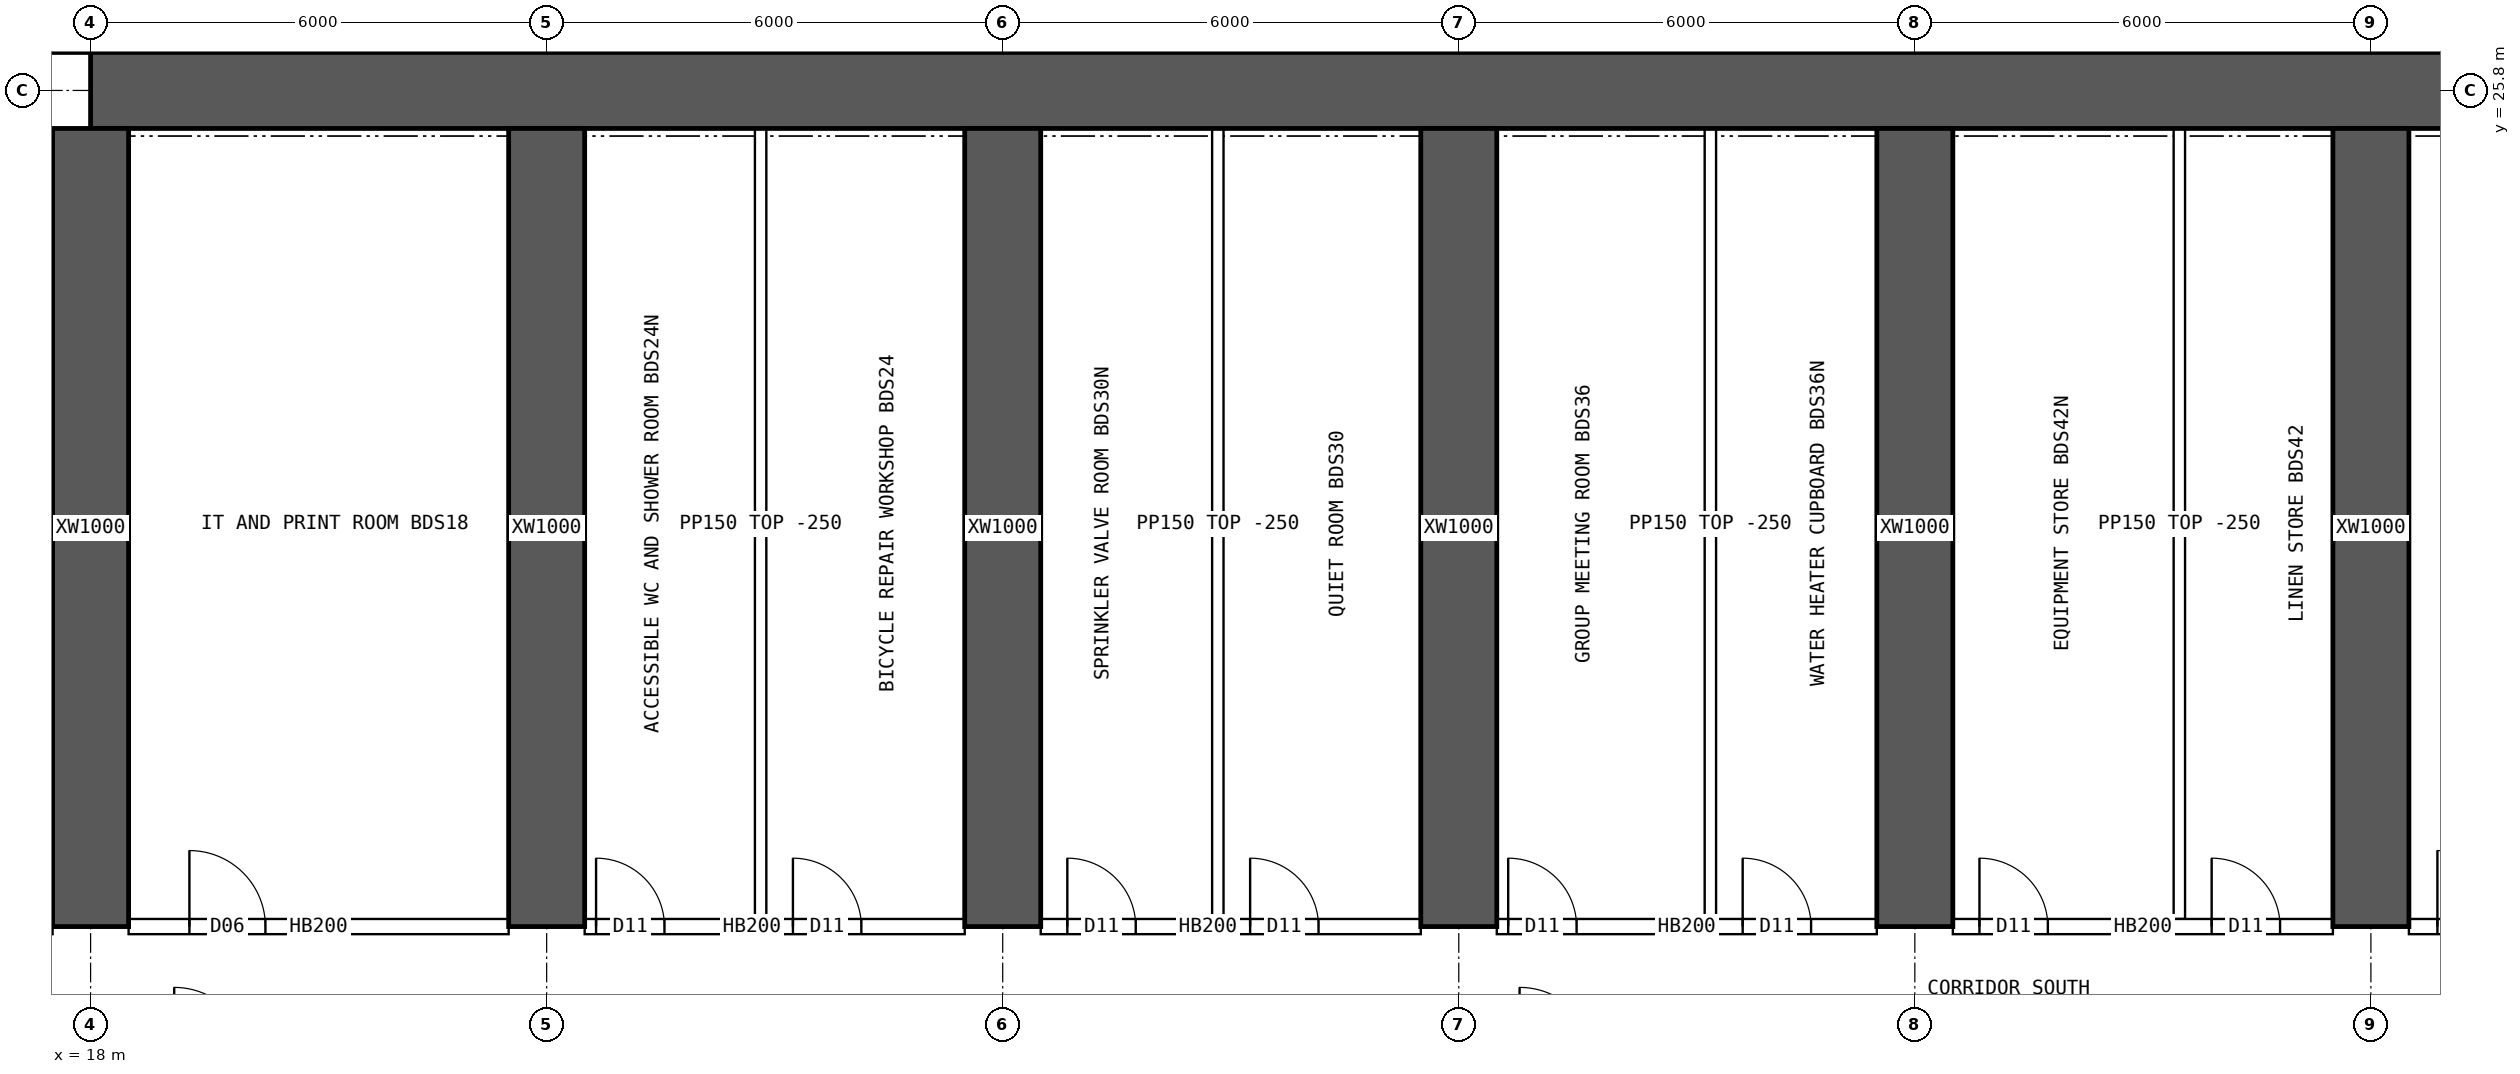
"""IFC4 building model, lengths in metres.
Left out: names, types, materials, properties, quantities, classifications, styles, units other than length and angle.
Written with IfcOpenShell. Run it as: python <this file> out.ifc"""

import sys

from ifc_helpers import new_model, si_unit, direction, frame, frame_2d, origin, place, context, subcontext, project, spatial, rectangle, extrude, element, fill, save


model = new_model("IFC4")
c1 = context("Model", 3, precision=1e-05, world=origin(), true_north=direction((0.0, 1.0)))
c2 = subcontext(c1, "Body", "Model", "MODEL_VIEW")
j1 = project(units=[si_unit("LENGTHUNIT", "METRE"), si_unit("PLANEANGLEUNIT", "RADIAN")], contexts=[c1])
p1 = place(None, origin())
s1 = spatial("IfcSite", under=j1, at=p1, CompositionType="ELEMENT")
p2 = place(p1, origin())
s2 = spatial("IfcBuilding", under=s1, at=p2, CompositionType="ELEMENT")
p3 = place(p2, frame((0.0, 0.0, 46.45)))
s3 = spatial("IfcBuildingStorey", under=s2, at=p3, CompositionType="ELEMENT", Elevation=46.45)
p4 = place(p3, frame((18.0, 25.8, 0.0), z_axis=(0.0, 0.0, 1.0), x_axis=(1.0, 0.0, 0.0)))
e1 = element("IfcWall", 1, at=p4, inside=s3, PredefinedType="SHEAR", context=c2, shape_type="SweptSolid", body=[
    extrude(rectangle(XDim=48.0, YDim=1.0, at=frame_2d((24.0, 0.0))), origin(), (0.0, 0.0, 1.0), 3.75),
])
for number, where, z_axis, x_axis in (
    (2, (18.0, 14.8, 0.0), (0.0, 0.0, 1.0), (0.0, 1.0, 0.0)),
    (3, (24.0, 14.8, 0.0), (0.0, 0.0, 1.0), (0.0, 1.0, 0.0)),
    (4, (30.0, 14.8, 0.0), (0.0, 0.0, 1.0), (0.0, 1.0, 0.0)),
    (5, (36.0, 14.8, 0.0), (0.0, 0.0, 1.0), (0.0, 1.0, 0.0)),
    (6, (42.0, 14.8, 0.0), (0.0, 0.0, 1.0), (0.0, 1.0, 0.0)),
    (7, (48.0, 14.8, 0.0), (0.0, 0.0, 1.0), (0.0, 1.0, 0.0)),
):
    element("IfcWall", number, at=place(p3, frame(where, z_axis=z_axis, x_axis=x_axis)), inside=s3, PredefinedType="SHEAR", context=c2, shape_type="SweptSolid", body=[
        extrude(rectangle(XDim=10.5, YDim=1.0, at=frame_2d((5.25, 0.0))), origin(), (0.0, 0.0, 1.0), 3.75),
    ])
p5 = place(p3, frame((18.5, 14.8, 0.0), z_axis=(0.0, 0.0, 1.0), x_axis=(1.0, 0.0, 0.0)))
e8 = element("IfcWall", 8, at=p5, inside=s3, PredefinedType="SOLIDWALL", context=c2, shape_type="SweptSolid", body=[
    extrude(rectangle(XDim=5.0, YDim=0.2, at=frame_2d((2.5, 0.0))), origin(), (0.0, 0.0, 1.0), 3.5),
])
p6 = place(p5, frame((0.8, 0.0, 0.0)))
e9 = element("IfcOpeningElement", 9, at=p6, cuts=e8, PredefinedType="OPENING", context=c2, shape_type="SweptSolid", body=[
    extrude(rectangle(XDim=1.0, YDim=2.1, at=frame_2d((0.5, 1.05))), frame((0.0, 0.11, 0.0), z_axis=(0.0, -1.0, 0.0), x_axis=(1.0, 0.0, 0.0)), (0.0, 0.0, 1.0), 0.22),
])
p7 = place(p3, frame((24.5, 14.8, 0.0), z_axis=(0.0, 0.0, 1.0), x_axis=(1.0, 0.0, 0.0)))
e10 = element("IfcWall", 10, at=p7, inside=s3, PredefinedType="SOLIDWALL", context=c2, shape_type="SweptSolid", body=[
    extrude(rectangle(XDim=5.0, YDim=0.2, at=frame_2d((2.5, 0.0))), origin(), (0.0, 0.0, 1.0), 3.5),
])
p8 = place(p7, frame((0.15, 0.0, 0.0)))
e11 = element("IfcOpeningElement", 11, at=p8, cuts=e10, PredefinedType="OPENING", context=c2, shape_type="SweptSolid", body=[
    extrude(rectangle(XDim=0.9, YDim=2.1, at=frame_2d((0.45, 1.05))), frame((0.0, 0.11, 0.0), z_axis=(0.0, -1.0, 0.0), x_axis=(1.0, 0.0, 0.0)), (0.0, 0.0, 1.0), 0.22),
])
p9 = place(p7, frame((2.74, 0.0, 0.0)))
e12 = element("IfcOpeningElement", 12, at=p9, cuts=e10, PredefinedType="OPENING", context=c2, shape_type="SweptSolid", body=[
    extrude(rectangle(XDim=0.9, YDim=2.1, at=frame_2d((0.45, 1.05))), frame((0.0, 0.11, 0.0), z_axis=(0.0, -1.0, 0.0), x_axis=(1.0, 0.0, 0.0)), (0.0, 0.0, 1.0), 0.22),
])
p10 = place(p3, frame((30.5, 14.8, 0.0), z_axis=(0.0, 0.0, 1.0), x_axis=(1.0, 0.0, 0.0)))
e13 = element("IfcWall", 13, at=p10, inside=s3, PredefinedType="SOLIDWALL", context=c2, shape_type="SweptSolid", body=[
    extrude(rectangle(XDim=5.0, YDim=0.2, at=frame_2d((2.5, 0.0))), origin(), (0.0, 0.0, 1.0), 3.5),
])
p11 = place(p10, frame((0.35, 0.0, 0.0)))
e14 = element("IfcOpeningElement", 14, at=p11, cuts=e13, PredefinedType="OPENING", context=c2, shape_type="SweptSolid", body=[
    extrude(rectangle(XDim=0.9, YDim=2.1, at=frame_2d((0.45, 1.05))), frame((0.0, 0.11, 0.0), z_axis=(0.0, -1.0, 0.0), x_axis=(1.0, 0.0, 0.0)), (0.0, 0.0, 1.0), 0.22),
])
p12 = place(p10, frame((2.755, 0.0, 0.0)))
e15 = element("IfcOpeningElement", 15, at=p12, cuts=e13, PredefinedType="OPENING", context=c2, shape_type="SweptSolid", body=[
    extrude(rectangle(XDim=0.9, YDim=2.1, at=frame_2d((0.45, 1.05))), frame((0.0, 0.11, 0.0), z_axis=(0.0, -1.0, 0.0), x_axis=(1.0, 0.0, 0.0)), (0.0, 0.0, 1.0), 0.22),
])
p13 = place(p3, frame((36.5, 14.8, 0.0), z_axis=(0.0, 0.0, 1.0), x_axis=(1.0, 0.0, 0.0)))
e16 = element("IfcWall", 16, at=p13, inside=s3, PredefinedType="SOLIDWALL", context=c2, shape_type="SweptSolid", body=[
    extrude(rectangle(XDim=5.0, YDim=0.2, at=frame_2d((2.5, 0.0))), origin(), (0.0, 0.0, 1.0), 3.5),
])
p14 = place(p13, frame((0.15, 0.0, 0.0)))
e17 = element("IfcOpeningElement", 17, at=p14, cuts=e16, PredefinedType="OPENING", context=c2, shape_type="SweptSolid", body=[
    extrude(rectangle(XDim=0.9, YDim=2.1, at=frame_2d((0.45, 1.05))), frame((0.0, 0.11, 0.0), z_axis=(0.0, -1.0, 0.0), x_axis=(1.0, 0.0, 0.0)), (0.0, 0.0, 1.0), 0.22),
])
p15 = place(p13, frame((3.235, 0.0, 0.0)))
e18 = element("IfcOpeningElement", 18, at=p15, cuts=e16, PredefinedType="OPENING", context=c2, shape_type="SweptSolid", body=[
    extrude(rectangle(XDim=0.9, YDim=2.1, at=frame_2d((0.45, 1.05))), frame((0.0, 0.11, 0.0), z_axis=(0.0, -1.0, 0.0), x_axis=(1.0, 0.0, 0.0)), (0.0, 0.0, 1.0), 0.22),
])
p16 = place(p3, frame((42.5, 14.8, 0.0), z_axis=(0.0, 0.0, 1.0), x_axis=(1.0, 0.0, 0.0)))
e19 = element("IfcWall", 19, at=p16, inside=s3, PredefinedType="SOLIDWALL", context=c2, shape_type="SweptSolid", body=[
    extrude(rectangle(XDim=5.0, YDim=0.2, at=frame_2d((2.5, 0.0))), origin(), (0.0, 0.0, 1.0), 3.5),
])
p17 = place(p16, frame((0.35, 0.0, 0.0)))
e20 = element("IfcOpeningElement", 20, at=p17, cuts=e19, PredefinedType="OPENING", context=c2, shape_type="SweptSolid", body=[
    extrude(rectangle(XDim=0.9, YDim=2.1, at=frame_2d((0.45, 1.05))), frame((0.0, 0.11, 0.0), z_axis=(0.0, -1.0, 0.0), x_axis=(1.0, 0.0, 0.0)), (0.0, 0.0, 1.0), 0.22),
])
p18 = place(p16, frame((3.405, 0.0, 0.0)))
e21 = element("IfcOpeningElement", 21, at=p18, cuts=e19, PredefinedType="OPENING", context=c2, shape_type="SweptSolid", body=[
    extrude(rectangle(XDim=0.9, YDim=2.1, at=frame_2d((0.45, 1.05))), frame((0.0, 0.11, 0.0), z_axis=(0.0, -1.0, 0.0), x_axis=(1.0, 0.0, 0.0)), (0.0, 0.0, 1.0), 0.22),
])
p19 = place(p3, frame((48.5, 14.8, 0.0), z_axis=(0.0, 0.0, 1.0), x_axis=(1.0, 0.0, 0.0)))
e22 = element("IfcWall", 22, at=p19, inside=s3, PredefinedType="SOLIDWALL", context=c2, shape_type="SweptSolid", body=[
    extrude(rectangle(XDim=5.0, YDim=0.2, at=frame_2d((2.5, 0.0))), origin(), (0.0, 0.0, 1.0), 3.5),
])
p20 = place(p19, frame((0.375, 0.0, 0.0)))
e23 = element("IfcOpeningElement", 23, at=p20, cuts=e22, PredefinedType="OPENING", context=c2, shape_type="SweptSolid", body=[
    extrude(rectangle(XDim=1.0, YDim=2.1, at=frame_2d((0.5, 1.05))), frame((0.0, 0.11, 0.0), z_axis=(0.0, -1.0, 0.0), x_axis=(1.0, 0.0, 0.0)), (0.0, 0.0, 1.0), 0.22),
])
for number, where, z_axis, x_axis in (
    (24, (26.815, 14.9, 0.0), (0.0, 0.0, 1.0), (0.0, 1.0, 0.0)),
    (25, (32.83, 14.9, 0.0), (0.0, 0.0, 1.0), (0.0, 1.0, 0.0)),
    (26, (39.31, 14.9, 0.0), (0.0, 0.0, 1.0), (0.0, 1.0, 0.0)),
    (27, (45.48, 14.9, 0.0), (0.0, 0.0, 1.0), (0.0, 1.0, 0.0)),
):
    element("IfcWall", number, at=place(p3, frame(where, z_axis=z_axis, x_axis=x_axis)), inside=s3, PredefinedType="PARTITIONING", context=c2, shape_type="SweptSolid", body=[
        extrude(rectangle(XDim=10.4, YDim=0.15, at=frame_2d((5.2, 0.0))), origin(), (0.0, 0.0, 1.0), 3.5),
    ])
p21 = place(p6, origin())
e28 = element("IfcDoor", 28, at=p21, inside=s3, OperationType="SINGLE_SWING_LEFT", PredefinedType="DOOR", context=c2, shape_type="SweptSolid", body=[
    extrude(rectangle(XDim=1.0, YDim=2.1, at=frame_2d((0.5, 1.05))), frame((0.0, 0.025, 0.0), z_axis=(0.0, -1.0, 0.0), x_axis=(1.0, 0.0, 0.0)), (0.0, 0.0, 1.0), 0.05),
])
fill(e9, e28)
p22 = place(p8, origin())
e29 = element("IfcDoor", 29, at=p22, inside=s3, OperationType="SINGLE_SWING_LEFT", PredefinedType="DOOR", context=c2, shape_type="SweptSolid", body=[
    extrude(rectangle(XDim=0.9, YDim=2.1, at=frame_2d((0.45, 1.05))), frame((0.0, 0.025, 0.0), z_axis=(0.0, -1.0, 0.0), x_axis=(1.0, 0.0, 0.0)), (0.0, 0.0, 1.0), 0.05),
])
fill(e11, e29)
p23 = place(p9, origin())
e30 = element("IfcDoor", 30, at=p23, inside=s3, OperationType="SINGLE_SWING_LEFT", PredefinedType="DOOR", context=c2, shape_type="SweptSolid", body=[
    extrude(rectangle(XDim=0.9, YDim=2.1, at=frame_2d((0.45, 1.05))), frame((0.0, 0.025, 0.0), z_axis=(0.0, -1.0, 0.0), x_axis=(1.0, 0.0, 0.0)), (0.0, 0.0, 1.0), 0.05),
])
fill(e12, e30)
p24 = place(p11, origin())
e31 = element("IfcDoor", 31, at=p24, inside=s3, OperationType="SINGLE_SWING_LEFT", PredefinedType="DOOR", context=c2, shape_type="SweptSolid", body=[
    extrude(rectangle(XDim=0.9, YDim=2.1, at=frame_2d((0.45, 1.05))), frame((0.0, 0.025, 0.0), z_axis=(0.0, -1.0, 0.0), x_axis=(1.0, 0.0, 0.0)), (0.0, 0.0, 1.0), 0.05),
])
fill(e14, e31)
p25 = place(p12, origin())
e32 = element("IfcDoor", 32, at=p25, inside=s3, OperationType="SINGLE_SWING_LEFT", PredefinedType="DOOR", context=c2, shape_type="SweptSolid", body=[
    extrude(rectangle(XDim=0.9, YDim=2.1, at=frame_2d((0.45, 1.05))), frame((0.0, 0.025, 0.0), z_axis=(0.0, -1.0, 0.0), x_axis=(1.0, 0.0, 0.0)), (0.0, 0.0, 1.0), 0.05),
])
fill(e15, e32)
p26 = place(p14, origin())
e33 = element("IfcDoor", 33, at=p26, inside=s3, OperationType="SINGLE_SWING_LEFT", PredefinedType="DOOR", context=c2, shape_type="SweptSolid", body=[
    extrude(rectangle(XDim=0.9, YDim=2.1, at=frame_2d((0.45, 1.05))), frame((0.0, 0.025, 0.0), z_axis=(0.0, -1.0, 0.0), x_axis=(1.0, 0.0, 0.0)), (0.0, 0.0, 1.0), 0.05),
])
fill(e17, e33)
p27 = place(p15, origin())
e34 = element("IfcDoor", 34, at=p27, inside=s3, OperationType="SINGLE_SWING_LEFT", PredefinedType="DOOR", context=c2, shape_type="SweptSolid", body=[
    extrude(rectangle(XDim=0.9, YDim=2.1, at=frame_2d((0.45, 1.05))), frame((0.0, 0.025, 0.0), z_axis=(0.0, -1.0, 0.0), x_axis=(1.0, 0.0, 0.0)), (0.0, 0.0, 1.0), 0.05),
])
fill(e18, e34)
p28 = place(p17, origin())
e35 = element("IfcDoor", 35, at=p28, inside=s3, OperationType="SINGLE_SWING_LEFT", PredefinedType="DOOR", context=c2, shape_type="SweptSolid", body=[
    extrude(rectangle(XDim=0.9, YDim=2.1, at=frame_2d((0.45, 1.05))), frame((0.0, 0.025, 0.0), z_axis=(0.0, -1.0, 0.0), x_axis=(1.0, 0.0, 0.0)), (0.0, 0.0, 1.0), 0.05),
])
fill(e20, e35)
p29 = place(p18, origin())
e36 = element("IfcDoor", 36, at=p29, inside=s3, OperationType="SINGLE_SWING_LEFT", PredefinedType="DOOR", context=c2, shape_type="SweptSolid", body=[
    extrude(rectangle(XDim=0.9, YDim=2.1, at=frame_2d((0.45, 1.05))), frame((0.0, 0.025, 0.0), z_axis=(0.0, -1.0, 0.0), x_axis=(1.0, 0.0, 0.0)), (0.0, 0.0, 1.0), 0.05),
])
fill(e21, e36)
p30 = place(p20, origin())
e37 = element("IfcDoor", 37, at=p30, inside=s3, OperationType="SINGLE_SWING_LEFT", PredefinedType="DOOR", context=c2, shape_type="SweptSolid", body=[
    extrude(rectangle(XDim=1.0, YDim=2.1, at=frame_2d((0.5, 1.05))), frame((0.0, 0.025, 0.0), z_axis=(0.0, -1.0, 0.0), x_axis=(1.0, 0.0, 0.0)), (0.0, 0.0, 1.0), 0.05),
])
fill(e23, e37)
save(model, sys.argv[1])
